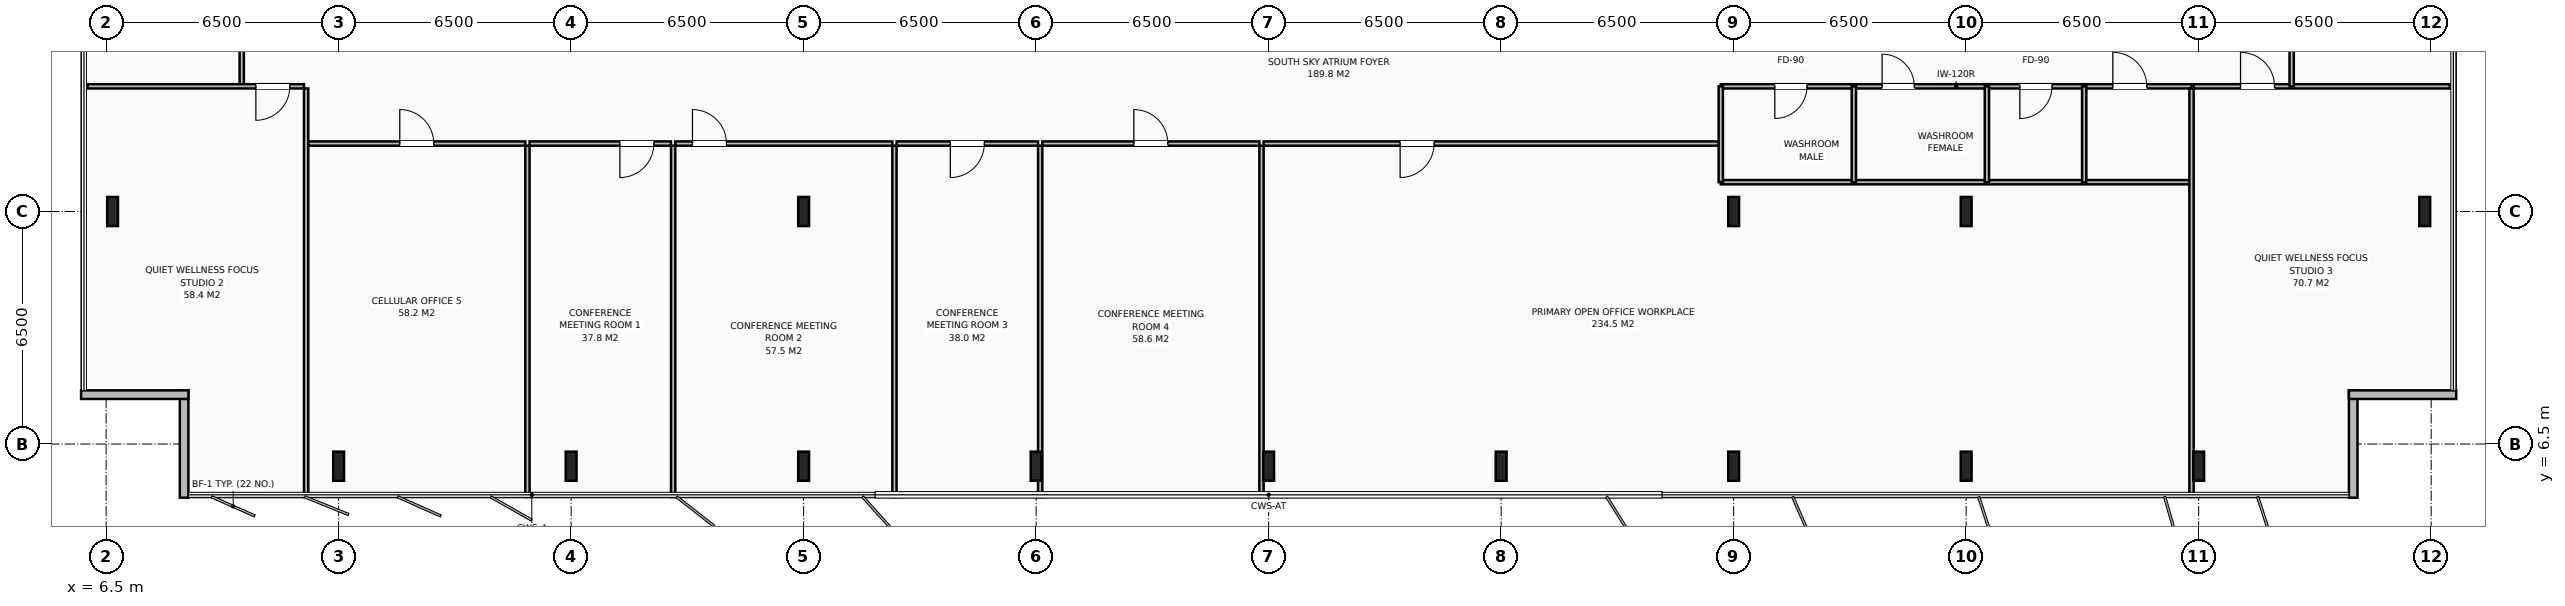
"""IFC4 building model, lengths in metres.
Left out: names, types, materials, properties, quantities, classifications, styles, units other than length and angle.
Written with IfcOpenShell. Run it as: python <this file> out.ifc"""

import sys

from ifc_helpers import new_model, si_unit, direction, frame, frame_2d, origin, origin_2d, place, context, subcontext, project, spatial, rectangle, i_section, extrude, element, fill, save


model = new_model("IFC4")
c1 = context("Model", 3, precision=1e-05, world=origin(), true_north=direction((0.0, 1.0)))
c2 = subcontext(c1, "Body", "Model", "MODEL_VIEW")
j1 = project(units=[si_unit("LENGTHUNIT", "METRE"), si_unit("PLANEANGLEUNIT", "RADIAN")], contexts=[c1])
p1 = place(None, origin())
s1 = spatial("IfcSite", under=j1, at=p1, CompositionType="ELEMENT")
p2 = place(p1, origin())
s2 = spatial("IfcBuilding", under=s1, at=p2, CompositionType="ELEMENT")
p3 = place(p2, frame((0.0, 0.0, 213.8)))
s3 = spatial("IfcBuildingStorey", under=s2, at=p3, CompositionType="ELEMENT", Elevation=213.8)
for number, where, z_axis, x_axis in (
    (1, (58.5, 13.0, 0.0), (0.0, 0.0, 1.0), (1.0, 0.0, 0.0)),
    (2, (26.0, 13.0, 0.0), (0.0, 0.0, 1.0), (1.0, 0.0, 0.0)),
    (3, (52.0, 13.0, 0.0), (0.0, 0.0, 1.0), (1.0, 0.0, 0.0)),
    (4, (13.0, 5.88, 0.0), (0.0, 0.0, 1.0), (1.0, 0.0, 0.0)),
    (5, (19.5, 5.88, 0.0), (0.0, 0.0, 1.0), (1.0, 0.0, 0.0)),
    (6, (26.0, 5.88, 0.0), (0.0, 0.0, 1.0), (1.0, 0.0, 0.0)),
    (7, (32.5, 5.88, 0.0), (0.0, 0.0, 1.0), (1.0, 0.0, 0.0)),
    (8, (39.0, 5.88, 0.0), (0.0, 0.0, 1.0), (1.0, 0.0, 0.0)),
    (9, (45.5, 5.88, 0.0), (0.0, 0.0, 1.0), (1.0, 0.0, 0.0)),
    (10, (52.0, 5.88, 0.0), (0.0, 0.0, 1.0), (1.0, 0.0, 0.0)),
    (11, (58.5, 5.88, 0.0), (0.0, 0.0, 1.0), (1.0, 0.0, 0.0)),
    (12, (65.0, 5.88, 0.0), (0.0, 0.0, 1.0), (1.0, 0.0, 0.0)),
    (13, (6.68, 13.0, 0.0), (0.0, 0.0, 1.0), (1.0, 0.0, 0.0)),
    (14, (71.32, 13.0, 0.0), (0.0, 0.0, 1.0), (1.0, 0.0, 0.0)),
):
    element("IfcColumn", number, at=place(p3, frame(where, z_axis=z_axis, x_axis=x_axis)), inside=s3, PredefinedType="COLUMN", context=c2, shape_type="SweptSolid", body=[
        extrude(i_section(OverallWidth=0.303, OverallDepth=0.814, WebThickness=0.021, FlangeThickness=0.04, at=origin_2d()), origin(), (0.0, 0.0, 1.0), 3.8),
    ])
for number, where, z_axis, x_axis in (
    (15, (8.68, 5.0, 0.0), (0.0, 0.0, 1.0), (0.0, 1.0, 0.0)),
    (16, (8.8, 7.88, 0.0), (0.0, 0.0, 1.0), (-1.0, 0.0, 0.0)),
    (17, (69.32, 8.0, 0.0), (0.0, 0.0, 1.0), (0.0, -1.0, 0.0)),
    (18, (72.2, 7.88, 0.0), (0.0, 0.0, 1.0), (-1.0, 0.0, 0.0)),
):
    element("IfcWall", number, at=place(p3, frame(where, z_axis=z_axis, x_axis=x_axis)), inside=s3, PredefinedType="STANDARD", context=c2, shape_type="SweptSolid", body=[
        extrude(rectangle(XDim=3.0, YDim=0.24, at=frame_2d((1.5, 0.0))), origin(), (0.0, 0.0, 1.0), 3.58),
    ])
p4 = place(p3, frame((10.291, 16.5, 0.0), z_axis=(0.0, 0.0, 1.0), x_axis=(0.0, 1.0, 0.0)))
e19 = element("IfcWall", 19, at=p4, inside=s3, PredefinedType="PARTITIONING", context=c2, shape_type="SweptSolid", body=[
    extrude(rectangle(XDim=2.1, YDim=0.12, at=frame_2d((1.05, 0.0))), origin(), (0.0, 0.0, 1.0), 3.58),
])
p5 = place(p3, frame((51.64, 16.5, 0.0), z_axis=(0.0, 0.0, 1.0), x_axis=(1.0, 0.0, 0.0)))
e20 = element("IfcWall", 20, at=p5, inside=s3, PredefinedType="PARTITIONING", context=c2, shape_type="SweptSolid", body=[
    extrude(rectangle(XDim=13.16, YDim=0.12, at=frame_2d((6.58, 0.0))), origin(), (0.0, 0.0, 1.0), 3.58),
])
p6 = place(p5, frame((1.51, 0.0, 0.0)))
e21 = element("IfcOpeningElement", 21, at=p6, cuts=e20, PredefinedType="OPENING", context=c2, shape_type="SweptSolid", body=[
    extrude(rectangle(XDim=0.9, YDim=2.15, at=frame_2d((0.45, 1.075))), frame((0.0, 0.07, 0.0), z_axis=(0.0, -1.0, 0.0), x_axis=(1.0, 0.0, 0.0)), (0.0, 0.0, 1.0), 0.14),
])
p7 = place(p5, frame((4.51, 0.0, 0.0)))
e22 = element("IfcOpeningElement", 22, at=p7, cuts=e20, PredefinedType="OPENING", context=c2, shape_type="SweptSolid", body=[
    extrude(rectangle(XDim=0.9, YDim=2.15, at=frame_2d((0.45, 1.075))), frame((0.0, 0.07, 0.0), z_axis=(0.0, -1.0, 0.0), x_axis=(1.0, 0.0, 0.0)), (0.0, 0.0, 1.0), 0.14),
])
p8 = place(p5, frame((8.36, 0.0, 0.0)))
e23 = element("IfcOpeningElement", 23, at=p8, cuts=e20, PredefinedType="OPENING", context=c2, shape_type="SweptSolid", body=[
    extrude(rectangle(XDim=0.9, YDim=2.15, at=frame_2d((0.45, 1.075))), frame((0.0, 0.07, 0.0), z_axis=(0.0, -1.0, 0.0), x_axis=(1.0, 0.0, 0.0)), (0.0, 0.0, 1.0), 0.14),
])
p9 = place(p5, frame((10.96, 0.0, 0.0)))
e24 = element("IfcOpeningElement", 24, at=p9, cuts=e20, PredefinedType="OPENING", context=c2, shape_type="SweptSolid", body=[
    extrude(rectangle(XDim=0.95, YDim=2.15, at=frame_2d((0.475, 1.075))), frame((0.0, 0.07, 0.0), z_axis=(0.0, -1.0, 0.0), x_axis=(1.0, 0.0, 0.0)), (0.0, 0.0, 1.0), 0.14),
])
p10 = place(p3, frame((51.64, 13.82, 0.0), z_axis=(0.0, 0.0, 1.0), x_axis=(1.0, 0.0, 0.0)))
e25 = element("IfcWall", 25, at=p10, inside=s3, PredefinedType="PARTITIONING", context=c2, shape_type="SweptSolid", body=[
    extrude(rectangle(XDim=13.16, YDim=0.12, at=frame_2d((6.58, 0.0))), origin(), (0.0, 0.0, 1.0), 3.58),
])
for number, where, z_axis, x_axis in (
    (26, (51.64, 13.82, 0.0), (0.0, 0.0, 1.0), (0.0, 1.0, 0.0)),
    (27, (55.36, 13.82, 0.0), (0.0, 0.0, 1.0), (0.0, 1.0, 0.0)),
    (28, (59.08, 13.82, 0.0), (0.0, 0.0, 1.0), (0.0, 1.0, 0.0)),
    (29, (61.8, 13.82, 0.0), (0.0, 0.0, 1.0), (0.0, 1.0, 0.0)),
):
    element("IfcWall", number, at=place(p3, frame(where, z_axis=z_axis, x_axis=x_axis)), inside=s3, PredefinedType="PARTITIONING", context=c2, shape_type="SweptSolid", body=[
        extrude(rectangle(XDim=2.68, YDim=0.12, at=frame_2d((1.34, 0.0))), origin(), (0.0, 0.0, 1.0), 3.58),
    ])
p11 = place(p3, frame((12.091, 5.02, 0.0), z_axis=(0.0, 0.0, 1.0), x_axis=(0.0, 1.0, 0.0)))
e30 = element("IfcWall", 30, at=p11, inside=s3, PredefinedType="PARTITIONING", context=c2, shape_type="SweptSolid", body=[
    extrude(rectangle(XDim=11.42, YDim=0.12, at=frame_2d((5.71, 0.0))), origin(), (0.0, 0.0, 1.0), 3.58),
])
p12 = place(p3, frame((5.98, 16.5, 0.0), z_axis=(0.0, 0.0, 1.0), x_axis=(1.0, 0.0, 0.0)))
e31 = element("IfcWall", 31, at=p12, inside=s3, PredefinedType="PARTITIONING", context=c2, shape_type="SweptSolid", body=[
    extrude(rectangle(XDim=6.051, YDim=0.12, at=frame_2d((3.026, 0.0))), origin(), (0.0, 0.0, 1.0), 3.58),
])
p13 = place(p12, frame((4.706, 0.0, 0.0)))
e32 = element("IfcOpeningElement", 32, at=p13, cuts=e31, PredefinedType="OPENING", context=c2, shape_type="SweptSolid", body=[
    extrude(rectangle(XDim=0.95, YDim=2.15, at=frame_2d((0.475, 1.075))), frame((0.0, 0.07, 0.0), z_axis=(0.0, -1.0, 0.0), x_axis=(1.0, 0.0, 0.0)), (0.0, 0.0, 1.0), 0.14),
])
p14 = place(p3, frame((18.278, 5.02, 0.0), z_axis=(0.0, 0.0, 1.0), x_axis=(0.0, 1.0, 0.0)))
e33 = element("IfcWall", 33, at=p14, inside=s3, PredefinedType="PARTITIONING", context=c2, shape_type="SweptSolid", body=[
    extrude(rectangle(XDim=9.82, YDim=0.12, at=frame_2d((4.91, 0.0))), origin(), (0.0, 0.0, 1.0), 3.58),
])
p15 = place(p3, frame((12.151, 14.9, 0.0), z_axis=(0.0, 0.0, 1.0), x_axis=(1.0, 0.0, 0.0)))
e34 = element("IfcWall", 34, at=p15, inside=s3, PredefinedType="PARTITIONING", context=c2, shape_type="SweptSolid", body=[
    extrude(rectangle(XDim=6.067, YDim=0.12, at=frame_2d((3.033, 0.0))), origin(), (0.0, 0.0, 1.0), 3.58),
])
p16 = place(p15, frame((2.558, 0.0, 0.0)))
e35 = element("IfcOpeningElement", 35, at=p16, cuts=e34, PredefinedType="OPENING", context=c2, shape_type="SweptSolid", body=[
    extrude(rectangle(XDim=0.95, YDim=2.15, at=frame_2d((0.475, 1.075))), frame((0.0, 0.07, 0.0), z_axis=(0.0, -1.0, 0.0), x_axis=(1.0, 0.0, 0.0)), (0.0, 0.0, 1.0), 0.14),
])
p17 = place(p3, frame((22.352, 5.02, 0.0), z_axis=(0.0, 0.0, 1.0), x_axis=(0.0, 1.0, 0.0)))
e36 = element("IfcWall", 36, at=p17, inside=s3, PredefinedType="PARTITIONING", context=c2, shape_type="SweptSolid", body=[
    extrude(rectangle(XDim=9.82, YDim=0.12, at=frame_2d((4.91, 0.0))), origin(), (0.0, 0.0, 1.0), 3.58),
])
p18 = place(p3, frame((18.338, 14.9, 0.0), z_axis=(0.0, 0.0, 1.0), x_axis=(1.0, 0.0, 0.0)))
e37 = element("IfcWall", 37, at=p18, inside=s3, PredefinedType="PARTITIONING", context=c2, shape_type="SweptSolid", body=[
    extrude(rectangle(XDim=3.954, YDim=0.12, at=frame_2d((1.977, 0.0))), origin(), (0.0, 0.0, 1.0), 3.58),
])
p19 = place(p18, frame((2.524, 0.0, 0.0)))
e38 = element("IfcOpeningElement", 38, at=p19, cuts=e37, PredefinedType="OPENING", context=c2, shape_type="SweptSolid", body=[
    extrude(rectangle(XDim=0.95, YDim=2.15, at=frame_2d((0.475, 1.075))), frame((0.0, 0.07, 0.0), z_axis=(0.0, -1.0, 0.0), x_axis=(1.0, 0.0, 0.0)), (0.0, 0.0, 1.0), 0.14),
])
p20 = place(p3, frame((28.539, 5.02, 0.0), z_axis=(0.0, 0.0, 1.0), x_axis=(0.0, 1.0, 0.0)))
e39 = element("IfcWall", 39, at=p20, inside=s3, PredefinedType="PARTITIONING", context=c2, shape_type="SweptSolid", body=[
    extrude(rectangle(XDim=9.82, YDim=0.12, at=frame_2d((4.91, 0.0))), origin(), (0.0, 0.0, 1.0), 3.58),
])
p21 = place(p3, frame((22.412, 14.9, 0.0), z_axis=(0.0, 0.0, 1.0), x_axis=(1.0, 0.0, 0.0)))
e40 = element("IfcWall", 40, at=p21, inside=s3, PredefinedType="PARTITIONING", context=c2, shape_type="SweptSolid", body=[
    extrude(rectangle(XDim=6.067, YDim=0.12, at=frame_2d((3.033, 0.0))), origin(), (0.0, 0.0, 1.0), 3.58),
])
p22 = place(p21, frame((0.48, 0.0, 0.0)))
e41 = element("IfcOpeningElement", 41, at=p22, cuts=e40, PredefinedType="OPENING", context=c2, shape_type="SweptSolid", body=[
    extrude(rectangle(XDim=0.95, YDim=2.15, at=frame_2d((0.475, 1.075))), frame((0.0, 0.07, 0.0), z_axis=(0.0, -1.0, 0.0), x_axis=(1.0, 0.0, 0.0)), (0.0, 0.0, 1.0), 0.14),
])
p23 = place(p3, frame((32.613, 5.02, 0.0), z_axis=(0.0, 0.0, 1.0), x_axis=(0.0, 1.0, 0.0)))
e42 = element("IfcWall", 42, at=p23, inside=s3, PredefinedType="PARTITIONING", context=c2, shape_type="SweptSolid", body=[
    extrude(rectangle(XDim=9.82, YDim=0.12, at=frame_2d((4.91, 0.0))), origin(), (0.0, 0.0, 1.0), 2.88),
])
p24 = place(p3, frame((28.599, 14.9, 0.0), z_axis=(0.0, 0.0, 1.0), x_axis=(1.0, 0.0, 0.0)))
e43 = element("IfcWall", 43, at=p24, inside=s3, PredefinedType="PARTITIONING", context=c2, shape_type="SweptSolid", body=[
    extrude(rectangle(XDim=3.954, YDim=0.12, at=frame_2d((1.977, 0.0))), origin(), (0.0, 0.0, 1.0), 3.58),
])
p25 = place(p24, frame((1.502, 0.0, 0.0)))
e44 = element("IfcOpeningElement", 44, at=p25, cuts=e43, PredefinedType="OPENING", context=c2, shape_type="SweptSolid", body=[
    extrude(rectangle(XDim=0.95, YDim=2.15, at=frame_2d((0.475, 1.075))), frame((0.0, 0.07, 0.0), z_axis=(0.0, -1.0, 0.0), x_axis=(1.0, 0.0, 0.0)), (0.0, 0.0, 1.0), 0.14),
])
p26 = place(p3, frame((38.8, 5.02, 0.0), z_axis=(0.0, 0.0, 1.0), x_axis=(0.0, 1.0, 0.0)))
e45 = element("IfcWall", 45, at=p26, inside=s3, PredefinedType="PARTITIONING", context=c2, shape_type="SweptSolid", body=[
    extrude(rectangle(XDim=9.82, YDim=0.12, at=frame_2d((4.91, 0.0))), origin(), (0.0, 0.0, 1.0), 2.88),
])
p27 = place(p3, frame((32.673, 14.9, 0.0), z_axis=(0.0, 0.0, 1.0), x_axis=(1.0, 0.0, 0.0)))
e46 = element("IfcWall", 46, at=p27, inside=s3, PredefinedType="PARTITIONING", context=c2, shape_type="SweptSolid", body=[
    extrude(rectangle(XDim=6.067, YDim=0.12, at=frame_2d((3.033, 0.0))), origin(), (0.0, 0.0, 1.0), 3.58),
])
p28 = place(p27, frame((2.558, 0.0, 0.0)))
e47 = element("IfcOpeningElement", 47, at=p28, cuts=e46, PredefinedType="OPENING", context=c2, shape_type="SweptSolid", body=[
    extrude(rectangle(XDim=0.95, YDim=2.15, at=frame_2d((0.475, 1.075))), frame((0.0, 0.07, 0.0), z_axis=(0.0, -1.0, 0.0), x_axis=(1.0, 0.0, 0.0)), (0.0, 0.0, 1.0), 0.14),
])
p29 = place(p3, frame((64.8, 5.02, 0.0), z_axis=(0.0, 0.0, 1.0), x_axis=(0.0, 1.0, 0.0)))
e48 = element("IfcWall", 48, at=p29, inside=s3, PredefinedType="PARTITIONING", context=c2, shape_type="SweptSolid", body=[
    extrude(rectangle(XDim=11.42, YDim=0.12, at=frame_2d((5.71, 0.0))), origin(), (0.0, 0.0, 1.0), 2.88),
])
p30 = place(p3, frame((38.86, 14.9, 0.0), z_axis=(0.0, 0.0, 1.0), x_axis=(1.0, 0.0, 0.0)))
e49 = element("IfcWall", 49, at=p30, inside=s3, PredefinedType="PARTITIONING", context=c2, shape_type="SweptSolid", body=[
    extrude(rectangle(XDim=12.72, YDim=0.12, at=frame_2d((6.36, 0.0))), origin(), (0.0, 0.0, 1.0), 3.58),
])
p31 = place(p30, frame((3.816, 0.0, 0.0)))
e50 = element("IfcOpeningElement", 50, at=p31, cuts=e49, PredefinedType="OPENING", context=c2, shape_type="SweptSolid", body=[
    extrude(rectangle(XDim=0.95, YDim=2.15, at=frame_2d((0.475, 1.075))), frame((0.0, 0.07, 0.0), z_axis=(0.0, -1.0, 0.0), x_axis=(1.0, 0.0, 0.0)), (0.0, 0.0, 1.0), 0.14),
])
p32 = place(p3, frame((64.86, 16.5, 0.0), z_axis=(0.0, 0.0, 1.0), x_axis=(1.0, 0.0, 0.0)))
e51 = element("IfcWall", 51, at=p32, inside=s3, PredefinedType="PARTITIONING", context=c2, shape_type="SweptSolid", body=[
    extrude(rectangle(XDim=7.16, YDim=0.12, at=frame_2d((3.58, 0.0))), origin(), (0.0, 0.0, 1.0), 3.58),
])
p33 = place(p32, frame((1.31, 0.0, 0.0)))
e52 = element("IfcOpeningElement", 52, at=p33, cuts=e51, PredefinedType="OPENING", context=c2, shape_type="SweptSolid", body=[
    extrude(rectangle(XDim=0.95, YDim=2.15, at=frame_2d((0.475, 1.075))), frame((0.0, 0.07, 0.0), z_axis=(0.0, -1.0, 0.0), x_axis=(1.0, 0.0, 0.0)), (0.0, 0.0, 1.0), 0.14),
])
p34 = place(p3, frame((67.6, 16.5, 0.0), z_axis=(0.0, 0.0, 1.0), x_axis=(0.0, 1.0, 0.0)))
e53 = element("IfcWall", 53, at=p34, inside=s3, PredefinedType="PARTITIONING", context=c2, shape_type="SweptSolid", body=[
    extrude(rectangle(XDim=19.0, YDim=0.12, at=frame_2d((9.5, 0.0))), origin(), (0.0, 0.0, 1.0), 3.58),
])
p35 = place(p34, frame((9.025, 0.0, 0.0)))
e54 = element("IfcOpeningElement", 54, at=p35, cuts=e53, PredefinedType="OPENING", context=c2, shape_type="SweptSolid", body=[
    extrude(rectangle(XDim=0.95, YDim=2.15, at=frame_2d((0.475, 1.075))), frame((0.0, 0.07, 0.0), z_axis=(0.0, -1.0, 0.0), x_axis=(1.0, 0.0, 0.0)), (0.0, 0.0, 1.0), 0.14),
])
p36 = place(p6, origin())
e55 = element("IfcDoor", 55, at=p36, inside=s3, OperationType="SINGLE_SWING_RIGHT", PredefinedType="DOOR", context=c2, shape_type="SweptSolid", body=[
    extrude(rectangle(XDim=0.9, YDim=2.15, at=frame_2d((0.45, 1.075))), frame((0.0, 0.025, 0.0), z_axis=(0.0, -1.0, 0.0), x_axis=(1.0, 0.0, 0.0)), (0.0, 0.0, 1.0), 0.05),
])
fill(e21, e55)
p37 = place(p7, origin())
e56 = element("IfcDoor", 56, at=p37, inside=s3, OperationType="SINGLE_SWING_LEFT", PredefinedType="DOOR", context=c2, shape_type="SweptSolid", body=[
    extrude(rectangle(XDim=0.9, YDim=2.15, at=frame_2d((0.45, 1.075))), frame((0.0, 0.025, 0.0), z_axis=(0.0, -1.0, 0.0), x_axis=(1.0, 0.0, 0.0)), (0.0, 0.0, 1.0), 0.05),
])
fill(e22, e56)
p38 = place(p8, origin())
e57 = element("IfcDoor", 57, at=p38, inside=s3, OperationType="SINGLE_SWING_RIGHT", PredefinedType="DOOR", context=c2, shape_type="SweptSolid", body=[
    extrude(rectangle(XDim=0.9, YDim=2.15, at=frame_2d((0.45, 1.075))), frame((0.0, 0.025, 0.0), z_axis=(0.0, -1.0, 0.0), x_axis=(1.0, 0.0, 0.0)), (0.0, 0.0, 1.0), 0.05),
])
fill(e23, e57)
p39 = place(p9, origin())
e58 = element("IfcDoor", 58, at=p39, inside=s3, OperationType="SINGLE_SWING_LEFT", PredefinedType="DOOR", context=c2, shape_type="SweptSolid", body=[
    extrude(rectangle(XDim=0.95, YDim=2.15, at=frame_2d((0.475, 1.075))), frame((0.0, 0.025, 0.0), z_axis=(0.0, -1.0, 0.0), x_axis=(1.0, 0.0, 0.0)), (0.0, 0.0, 1.0), 0.05),
])
fill(e24, e58)
p40 = place(p13, origin())
e59 = element("IfcDoor", 59, at=p40, inside=s3, OperationType="SINGLE_SWING_RIGHT", PredefinedType="DOOR", context=c2, shape_type="SweptSolid", body=[
    extrude(rectangle(XDim=0.95, YDim=2.15, at=frame_2d((0.475, 1.075))), frame((0.0, 0.025, 0.0), z_axis=(0.0, -1.0, 0.0), x_axis=(1.0, 0.0, 0.0)), (0.0, 0.0, 1.0), 0.05),
])
fill(e32, e59)
p41 = place(p16, origin())
e60 = element("IfcDoor", 60, at=p41, inside=s3, OperationType="SINGLE_SWING_LEFT", PredefinedType="DOOR", context=c2, shape_type="SweptSolid", body=[
    extrude(rectangle(XDim=0.95, YDim=2.15, at=frame_2d((0.475, 1.075))), frame((0.0, 0.025, 0.0), z_axis=(0.0, -1.0, 0.0), x_axis=(1.0, 0.0, 0.0)), (0.0, 0.0, 1.0), 0.05),
])
fill(e35, e60)
p42 = place(p19, origin())
e61 = element("IfcDoor", 61, at=p42, inside=s3, OperationType="SINGLE_SWING_RIGHT", PredefinedType="DOOR", context=c2, shape_type="SweptSolid", body=[
    extrude(rectangle(XDim=0.95, YDim=2.15, at=frame_2d((0.475, 1.075))), frame((0.0, 0.025, 0.0), z_axis=(0.0, -1.0, 0.0), x_axis=(1.0, 0.0, 0.0)), (0.0, 0.0, 1.0), 0.05),
])
fill(e38, e61)
p43 = place(p22, origin())
e62 = element("IfcDoor", 62, at=p43, inside=s3, OperationType="SINGLE_SWING_LEFT", PredefinedType="DOOR", context=c2, shape_type="SweptSolid", body=[
    extrude(rectangle(XDim=0.95, YDim=2.15, at=frame_2d((0.475, 1.075))), frame((0.0, 0.025, 0.0), z_axis=(0.0, -1.0, 0.0), x_axis=(1.0, 0.0, 0.0)), (0.0, 0.0, 1.0), 0.05),
])
fill(e41, e62)
p44 = place(p25, origin())
e63 = element("IfcDoor", 63, at=p44, inside=s3, OperationType="SINGLE_SWING_RIGHT", PredefinedType="DOOR", context=c2, shape_type="SweptSolid", body=[
    extrude(rectangle(XDim=0.95, YDim=2.15, at=frame_2d((0.475, 1.075))), frame((0.0, 0.025, 0.0), z_axis=(0.0, -1.0, 0.0), x_axis=(1.0, 0.0, 0.0)), (0.0, 0.0, 1.0), 0.05),
])
fill(e44, e63)
p45 = place(p28, origin())
e64 = element("IfcDoor", 64, at=p45, inside=s3, OperationType="SINGLE_SWING_LEFT", PredefinedType="DOOR", context=c2, shape_type="SweptSolid", body=[
    extrude(rectangle(XDim=0.95, YDim=2.15, at=frame_2d((0.475, 1.075))), frame((0.0, 0.025, 0.0), z_axis=(0.0, -1.0, 0.0), x_axis=(1.0, 0.0, 0.0)), (0.0, 0.0, 1.0), 0.05),
])
fill(e47, e64)
p46 = place(p31, origin())
e65 = element("IfcDoor", 65, at=p46, inside=s3, OperationType="SINGLE_SWING_RIGHT", PredefinedType="DOOR", context=c2, shape_type="SweptSolid", body=[
    extrude(rectangle(XDim=0.95, YDim=2.15, at=frame_2d((0.475, 1.075))), frame((0.0, 0.025, 0.0), z_axis=(0.0, -1.0, 0.0), x_axis=(1.0, 0.0, 0.0)), (0.0, 0.0, 1.0), 0.05),
])
fill(e50, e65)
p47 = place(p33, origin())
e66 = element("IfcDoor", 66, at=p47, inside=s3, OperationType="SINGLE_SWING_LEFT", PredefinedType="DOOR", context=c2, shape_type="SweptSolid", body=[
    extrude(rectangle(XDim=0.95, YDim=2.15, at=frame_2d((0.475, 1.075))), frame((0.0, 0.025, 0.0), z_axis=(0.0, -1.0, 0.0), x_axis=(1.0, 0.0, 0.0)), (0.0, 0.0, 1.0), 0.05),
])
fill(e52, e66)
save(model, sys.argv[1])
